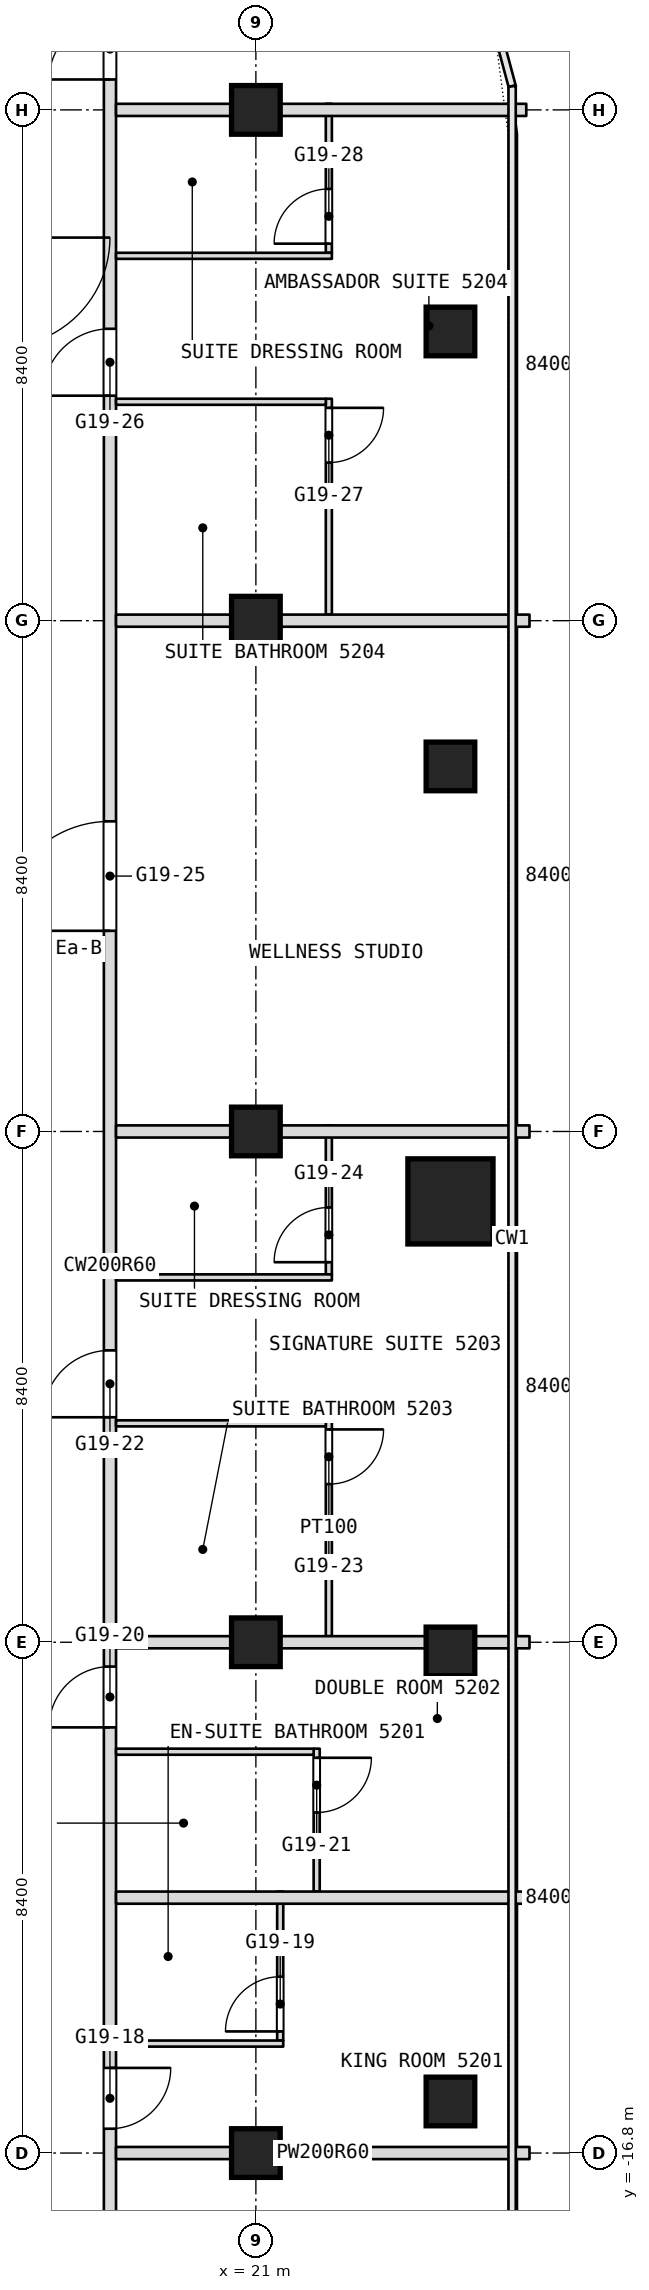
"""IFC4 building model, lengths in metres.
Left out: names, types, materials, properties, quantities, classifications, styles, units other than length and angle.
Written with IfcOpenShell. Run it as: python <this file> out.ifc"""

import sys

from ifc_helpers import new_model, si_unit, direction, frame, frame_2d, origin, origin_2d, place, context, subcontext, project, spatial, rectangle, extrude, element, fill, save


model = new_model("IFC4")
c1 = context("Model", 3, precision=1e-05, world=origin(), true_north=direction((0.0, 1.0)))
c2 = subcontext(c1, "Body", "Model", "MODEL_VIEW")
j1 = project(units=[si_unit("LENGTHUNIT", "METRE"), si_unit("PLANEANGLEUNIT", "RADIAN")], contexts=[c1])
p1 = place(None, origin())
s1 = spatial("IfcSite", under=j1, at=p1, CompositionType="ELEMENT")
p2 = place(p1, origin())
s2 = spatial("IfcBuilding", under=s1, at=p2, CompositionType="ELEMENT")
p3 = place(p2, frame((0.0, 0.0, 223.7)))
s3 = spatial("IfcBuildingStorey", under=s2, at=p3, CompositionType="ELEMENT", Elevation=223.7)
p4 = place(p3, frame((24.2, -1.15, 0.0), z_axis=(0.0, 0.0, 1.0), x_axis=(1.0, 0.0, 0.0)))
e1 = element("IfcColumn", 1, at=p4, inside=s3, PredefinedType="COLUMN", context=c2, shape_type="SweptSolid", body=[
    extrude(rectangle(XDim=1.4, YDim=1.4, at=origin_2d()), origin(), (0.0, 0.0, 1.0), 3.6),
])
for number, where, z_axis, x_axis in (
    (2, (21.0, -16.8, 0.0), (0.0, 0.0, 1.0), (1.0, 0.0, 0.0)),
    (3, (21.0, -8.4, 0.0), (0.0, 0.0, 1.0), (1.0, 0.0, 0.0)),
    (4, (21.0, 0.0, 0.0), (0.0, 0.0, 1.0), (1.0, 0.0, 0.0)),
    (5, (21.0, 8.4, 0.0), (0.0, 0.0, 1.0), (1.0, 0.0, 0.0)),
    (6, (21.0, 16.8, 0.0), (0.0, 0.0, 1.0), (1.0, 0.0, 0.0)),
    (7, (24.2, 13.156, 0.0), (0.0, 0.0, 1.0), (1.0, 0.0, 0.0)),
    (8, (24.2, 6.003, 0.0), (0.0, 0.0, 1.0), (1.0, 0.0, 0.0)),
    (9, (24.2, -8.551, 0.0), (0.0, 0.0, 1.0), (1.0, 0.0, 0.0)),
    (10, (24.2, -15.952, 0.0), (0.0, 0.0, 1.0), (1.0, 0.0, 0.0)),
):
    element("IfcColumn", number, at=place(p3, frame(where, z_axis=z_axis, x_axis=x_axis)), inside=s3, PredefinedType="COLUMN", context=c2, shape_type="SweptSolid", body=[
        extrude(rectangle(XDim=0.8, YDim=0.8, at=origin_2d()), origin(), (0.0, 0.0, 1.0), 3.6),
    ])
p5 = place(p3, frame((22.2, -8.3, 0.0), z_axis=(0.0, 0.0, 1.0), x_axis=(0.0, 1.0, 0.0)))
e11 = element("IfcWall", 11, at=p5, inside=s3, PredefinedType="PARTITIONING", context=c2, shape_type="SweptSolid", body=[
    extrude(rectangle(XDim=3.55, YDim=0.1, at=frame_2d((1.775, 0.0))), origin(), (0.0, 0.0, 1.0), 3.34),
])
p6 = place(p5, frame((2.5, 0.0, 0.0)))
e12 = element("IfcOpeningElement", 12, at=p6, cuts=e11, PredefinedType="OPENING", context=c2, shape_type="SweptSolid", body=[
    extrude(rectangle(XDim=0.9, YDim=2.1, at=frame_2d((0.45, 1.05))), frame((0.0, 0.05, 0.0), z_axis=(0.0, -1.0, 0.0), x_axis=(1.0, 0.0, 0.0)), (0.0, 0.0, 1.0), 0.1),
])
p7 = place(p3, frame((22.2, -2.35, 0.0), z_axis=(0.0, 0.0, 1.0), x_axis=(0.0, 1.0, 0.0)))
e13 = element("IfcWall", 13, at=p7, inside=s3, PredefinedType="PARTITIONING", context=c2, shape_type="SweptSolid", body=[
    extrude(rectangle(XDim=2.45, YDim=0.1, at=frame_2d((1.225, 0.0))), origin(), (0.0, 0.0, 1.0), 3.34),
])
p8 = place(p7, frame((0.2, 0.0, 0.0)))
e14 = element("IfcOpeningElement", 14, at=p8, cuts=e13, PredefinedType="OPENING", context=c2, shape_type="SweptSolid", body=[
    extrude(rectangle(XDim=0.9, YDim=2.1, at=frame_2d((0.45, 1.05))), frame((0.0, 0.05, 0.0), z_axis=(0.0, -1.0, 0.0), x_axis=(1.0, 0.0, 0.0)), (0.0, 0.0, 1.0), 0.1),
])
p9 = place(p3, frame((22.2, 8.5, 0.0), z_axis=(0.0, 0.0, 1.0), x_axis=(0.0, 1.0, 0.0)))
e15 = element("IfcWall", 15, at=p9, inside=s3, PredefinedType="PARTITIONING", context=c2, shape_type="SweptSolid", body=[
    extrude(rectangle(XDim=3.55, YDim=0.1, at=frame_2d((1.775, 0.0))), origin(), (0.0, 0.0, 1.0), 3.34),
])
p10 = place(p9, frame((2.5, 0.0, 0.0)))
e16 = element("IfcOpeningElement", 16, at=p10, cuts=e15, PredefinedType="OPENING", context=c2, shape_type="SweptSolid", body=[
    extrude(rectangle(XDim=0.9, YDim=2.1, at=frame_2d((0.45, 1.05))), frame((0.0, 0.05, 0.0), z_axis=(0.0, -1.0, 0.0), x_axis=(1.0, 0.0, 0.0)), (0.0, 0.0, 1.0), 0.1),
])
p11 = place(p3, frame((22.2, 14.45, 0.0), z_axis=(0.0, 0.0, 1.0), x_axis=(0.0, 1.0, 0.0)))
e17 = element("IfcWall", 17, at=p11, inside=s3, PredefinedType="PARTITIONING", context=c2, shape_type="SweptSolid", body=[
    extrude(rectangle(XDim=2.45, YDim=0.1, at=frame_2d((1.225, 0.0))), origin(), (0.0, 0.0, 1.0), 3.34),
])
p12 = place(p11, frame((0.15, 0.0, 0.0)))
e18 = element("IfcOpeningElement", 18, at=p12, cuts=e17, PredefinedType="OPENING", context=c2, shape_type="SweptSolid", body=[
    extrude(rectangle(XDim=0.9, YDim=2.1, at=frame_2d((0.45, 1.05))), frame((0.0, 0.05, 0.0), z_axis=(0.0, -1.0, 0.0), x_axis=(1.0, 0.0, 0.0)), (0.0, 0.0, 1.0), 0.1),
])
p13 = place(p3, frame((22.0, -12.5, 0.0), z_axis=(0.0, 0.0, 1.0), x_axis=(0.0, 1.0, 0.0)))
e19 = element("IfcWall", 19, at=p13, inside=s3, PredefinedType="PARTITIONING", context=c2, shape_type="SweptSolid", body=[
    extrude(rectangle(XDim=2.35, YDim=0.1, at=frame_2d((1.175, 0.0))), origin(), (0.0, 0.0, 1.0), 3.34),
])
p14 = place(p13, frame((1.3, 0.0, 0.0)))
e20 = element("IfcOpeningElement", 20, at=p14, cuts=e19, PredefinedType="OPENING", context=c2, shape_type="SweptSolid", body=[
    extrude(rectangle(XDim=0.9, YDim=2.1, at=frame_2d((0.45, 1.05))), frame((0.0, 0.05, 0.0), z_axis=(0.0, -1.0, 0.0), x_axis=(1.0, 0.0, 0.0)), (0.0, 0.0, 1.0), 0.1),
])
p15 = place(p3, frame((21.4, -14.95, 0.0), z_axis=(0.0, 0.0, 1.0), x_axis=(0.0, 1.0, 0.0)))
e21 = element("IfcWall", 21, at=p15, inside=s3, PredefinedType="PARTITIONING", context=c2, shape_type="SweptSolid", body=[
    extrude(rectangle(XDim=2.45, YDim=0.1, at=frame_2d((1.225, 0.0))), origin(), (0.0, 0.0, 1.0), 3.34),
])
p16 = place(p15, frame((0.15, 0.0, 0.0)))
e22 = element("IfcOpeningElement", 22, at=p16, cuts=e21, PredefinedType="OPENING", context=c2, shape_type="SweptSolid", body=[
    extrude(rectangle(XDim=0.9, YDim=2.1, at=frame_2d((0.45, 1.05))), frame((0.0, 0.05, 0.0), z_axis=(0.0, -1.0, 0.0), x_axis=(1.0, 0.0, 0.0)), (0.0, 0.0, 1.0), 0.1),
])
p17 = place(p3, frame((18.6, -26.751, 0.0), z_axis=(0.0, 0.0, 1.0), x_axis=(0.0, 1.0, 0.0)))
e23 = element("IfcWall", 23, at=p17, inside=s3, PredefinedType="PARTITIONING", context=c2, shape_type="SweptSolid", body=[
    extrude(rectangle(XDim=49.091, YDim=0.2, at=frame_2d((24.545, 0.0))), origin(), (0.0, 0.0, 1.0), 3.34),
])
p18 = place(p17, frame((4.226, 0.0, 0.0)))
e24 = element("IfcOpeningElement", 24, at=p18, cuts=e23, PredefinedType="OPENING", context=c2, shape_type="SweptSolid", body=[
    extrude(rectangle(XDim=1.8, YDim=2.1, at=frame_2d((0.9, 1.05))), frame((0.0, 0.1, 0.0), z_axis=(0.0, -1.0, 0.0), x_axis=(1.0, 0.0, 0.0)), (0.0, 0.0, 1.0), 0.2),
])
p19 = place(p17, frame((10.351, 0.0, 0.0)))
e25 = element("IfcOpeningElement", 25, at=p19, cuts=e23, PredefinedType="OPENING", context=c2, shape_type="SweptSolid", body=[
    extrude(rectangle(XDim=1.0, YDim=2.1, at=frame_2d((0.5, 1.05))), frame((0.0, 0.1, 0.0), z_axis=(0.0, -1.0, 0.0), x_axis=(1.0, 0.0, 0.0)), (0.0, 0.0, 1.0), 0.2),
])
p20 = place(p17, frame((16.951, 0.0, 0.0)))
e26 = element("IfcOpeningElement", 26, at=p20, cuts=e23, PredefinedType="OPENING", context=c2, shape_type="SweptSolid", body=[
    extrude(rectangle(XDim=1.0, YDim=2.1, at=frame_2d((0.5, 1.05))), frame((0.0, 0.1, 0.0), z_axis=(0.0, -1.0, 0.0), x_axis=(1.0, 0.0, 0.0)), (0.0, 0.0, 1.0), 0.2),
])
p21 = place(p17, frame((22.051, 0.0, 0.0)))
e27 = element("IfcOpeningElement", 27, at=p21, cuts=e23, PredefinedType="OPENING", context=c2, shape_type="SweptSolid", body=[
    extrude(rectangle(XDim=1.1, YDim=2.1, at=frame_2d((0.55, 1.05))), frame((0.0, 0.1, 0.0), z_axis=(0.0, -1.0, 0.0), x_axis=(1.0, 0.0, 0.0)), (0.0, 0.0, 1.0), 0.2),
])
p22 = place(p17, frame((30.051, 0.0, 0.0)))
e28 = element("IfcOpeningElement", 28, at=p22, cuts=e23, PredefinedType="OPENING", context=c2, shape_type="SweptSolid", body=[
    extrude(rectangle(XDim=1.8, YDim=2.1, at=frame_2d((0.9, 1.05))), frame((0.0, 0.1, 0.0), z_axis=(0.0, -1.0, 0.0), x_axis=(1.0, 0.0, 0.0)), (0.0, 0.0, 1.0), 0.2),
])
p23 = place(p17, frame((38.851, 0.0, 0.0)))
e29 = element("IfcOpeningElement", 29, at=p23, cuts=e23, PredefinedType="OPENING", context=c2, shape_type="SweptSolid", body=[
    extrude(rectangle(XDim=1.1, YDim=2.1, at=frame_2d((0.55, 1.05))), frame((0.0, 0.1, 0.0), z_axis=(0.0, -1.0, 0.0), x_axis=(1.0, 0.0, 0.0)), (0.0, 0.0, 1.0), 0.2),
])
p24 = place(p17, frame((44.051, 0.0, 0.0)))
e30 = element("IfcOpeningElement", 30, at=p24, cuts=e23, PredefinedType="OPENING", context=c2, shape_type="SweptSolid", body=[
    extrude(rectangle(XDim=1.0, YDim=2.1, at=frame_2d((0.5, 1.05))), frame((0.0, 0.1, 0.0), z_axis=(0.0, -1.0, 0.0), x_axis=(1.0, 0.0, 0.0)), (0.0, 0.0, 1.0), 0.2),
])
p25 = place(p3, frame((18.7, -16.8, 0.0), z_axis=(0.0, 0.0, 1.0), x_axis=(1.0, 0.0, 0.0)))
e31 = element("IfcWall", 31, at=p25, inside=s3, PredefinedType="PARTITIONING", context=c2, shape_type="SweptSolid", body=[
    extrude(rectangle(XDim=6.8, YDim=0.2, at=frame_2d((3.4, 0.0))), origin(), (0.0, 0.0, 1.0), 2.94),
])
p26 = place(p3, frame((18.7, -15.0, 0.0), z_axis=(0.0, 0.0, 1.0), x_axis=(1.0, 0.0, 0.0)))
e32 = element("IfcWall", 32, at=p26, inside=s3, PredefinedType="PARTITIONING", context=c2, shape_type="SweptSolid", body=[
    extrude(rectangle(XDim=2.75, YDim=0.1, at=frame_2d((1.375, 0.0))), origin(), (0.0, 0.0, 1.0), 3.34),
])
p27 = place(p3, frame((18.7, -12.6, 0.0), z_axis=(0.0, 0.0, 1.0), x_axis=(1.0, 0.0, 0.0)))
e33 = element("IfcWall", 33, at=p27, inside=s3, PredefinedType="PARTITIONING", context=c2, shape_type="SweptSolid", body=[
    extrude(rectangle(XDim=6.8, YDim=0.2, at=frame_2d((3.4, 0.0))), origin(), (0.0, 0.0, 1.0), 3.34),
])
p28 = place(p3, frame((18.7, -10.2, 0.0), z_axis=(0.0, 0.0, 1.0), x_axis=(1.0, 0.0, 0.0)))
e34 = element("IfcWall", 34, at=p28, inside=s3, PredefinedType="PARTITIONING", context=c2, shape_type="SweptSolid", body=[
    extrude(rectangle(XDim=3.25, YDim=0.1, at=frame_2d((1.625, 0.0))), origin(), (0.0, 0.0, 1.0), 3.34),
])
p29 = place(p3, frame((18.7, -8.4, 0.0), z_axis=(0.0, 0.0, 1.0), x_axis=(1.0, 0.0, 0.0)))
e35 = element("IfcWall", 35, at=p29, inside=s3, PredefinedType="PARTITIONING", context=c2, shape_type="SweptSolid", body=[
    extrude(rectangle(XDim=6.8, YDim=0.2, at=frame_2d((3.4, 0.0))), origin(), (0.0, 0.0, 1.0), 2.94),
])
p30 = place(p3, frame((18.7, -4.8, 0.0), z_axis=(0.0, 0.0, 1.0), x_axis=(1.0, 0.0, 0.0)))
e36 = element("IfcWall", 36, at=p30, inside=s3, PredefinedType="PARTITIONING", context=c2, shape_type="SweptSolid", body=[
    extrude(rectangle(XDim=3.45, YDim=0.1, at=frame_2d((1.725, 0.0))), origin(), (0.0, 0.0, 1.0), 3.34),
])
p31 = place(p3, frame((18.7, -2.4, 0.0), z_axis=(0.0, 0.0, 1.0), x_axis=(1.0, 0.0, 0.0)))
e37 = element("IfcWall", 37, at=p31, inside=s3, PredefinedType="PARTITIONING", context=c2, shape_type="SweptSolid", body=[
    extrude(rectangle(XDim=3.55, YDim=0.1, at=frame_2d((1.775, 0.0))), origin(), (0.0, 0.0, 1.0), 3.34),
])
for number, where, z_axis, x_axis in (
    (38, (18.7, 0.0, 0.0), (0.0, 0.0, 1.0), (1.0, 0.0, 0.0)),
    (39, (18.7, 8.4, 0.0), (0.0, 0.0, 1.0), (1.0, 0.0, 0.0)),
):
    element("IfcWall", number, at=place(p3, frame(where, z_axis=z_axis, x_axis=x_axis)), inside=s3, PredefinedType="PARTITIONING", context=c2, shape_type="SweptSolid", body=[
        extrude(rectangle(XDim=6.8, YDim=0.2, at=frame_2d((3.4, 0.0))), origin(), (0.0, 0.0, 1.0), 2.94),
    ])
p32 = place(p3, frame((18.7, 12.0, 0.0), z_axis=(0.0, 0.0, 1.0), x_axis=(1.0, 0.0, 0.0)))
e40 = element("IfcWall", 40, at=p32, inside=s3, PredefinedType="PARTITIONING", context=c2, shape_type="SweptSolid", body=[
    extrude(rectangle(XDim=3.45, YDim=0.1, at=frame_2d((1.725, 0.0))), origin(), (0.0, 0.0, 1.0), 3.34),
])
p33 = place(p3, frame((18.7, 14.4, 0.0), z_axis=(0.0, 0.0, 1.0), x_axis=(1.0, 0.0, 0.0)))
e41 = element("IfcWall", 41, at=p33, inside=s3, PredefinedType="PARTITIONING", context=c2, shape_type="SweptSolid", body=[
    extrude(rectangle(XDim=3.55, YDim=0.1, at=frame_2d((1.775, 0.0))), origin(), (0.0, 0.0, 1.0), 3.34),
])
p34 = place(p3, frame((18.7, 16.8, 0.0), z_axis=(0.0, 0.0, 1.0), x_axis=(1.0, 0.0, 0.0)))
e42 = element("IfcWall", 42, at=p34, inside=s3, PredefinedType="PARTITIONING", context=c2, shape_type="SweptSolid", body=[
    extrude(rectangle(XDim=6.747, YDim=0.2, at=frame_2d((3.374, 0.0))), origin(), (0.0, 0.0, 1.0), 2.94),
])
p35 = place(p6, origin())
e43 = element("IfcDoor", 43, at=p35, inside=s3, OperationType="SINGLE_SWING_RIGHT", PredefinedType="DOOR", context=c2, shape_type="SweptSolid", body=[
    extrude(rectangle(XDim=0.9, YDim=2.1, at=frame_2d((0.45, 1.05))), frame((0.0, 0.025, 0.0), z_axis=(0.0, -1.0, 0.0), x_axis=(1.0, 0.0, 0.0)), (0.0, 0.0, 1.0), 0.05),
])
fill(e12, e43)
p36 = place(p8, origin())
e44 = element("IfcDoor", 44, at=p36, inside=s3, OperationType="SINGLE_SWING_LEFT", PredefinedType="DOOR", context=c2, shape_type="SweptSolid", body=[
    extrude(rectangle(XDim=0.9, YDim=2.1, at=frame_2d((0.45, 1.05))), frame((0.0, 0.025, 0.0), z_axis=(0.0, -1.0, 0.0), x_axis=(1.0, 0.0, 0.0)), (0.0, 0.0, 1.0), 0.05),
])
fill(e14, e44)
p37 = place(p10, origin())
e45 = element("IfcDoor", 45, at=p37, inside=s3, OperationType="SINGLE_SWING_RIGHT", PredefinedType="DOOR", context=c2, shape_type="SweptSolid", body=[
    extrude(rectangle(XDim=0.9, YDim=2.1, at=frame_2d((0.45, 1.05))), frame((0.0, 0.025, 0.0), z_axis=(0.0, -1.0, 0.0), x_axis=(1.0, 0.0, 0.0)), (0.0, 0.0, 1.0), 0.05),
])
fill(e16, e45)
p38 = place(p12, origin())
e46 = element("IfcDoor", 46, at=p38, inside=s3, OperationType="SINGLE_SWING_LEFT", PredefinedType="DOOR", context=c2, shape_type="SweptSolid", body=[
    extrude(rectangle(XDim=0.9, YDim=2.1, at=frame_2d((0.45, 1.05))), frame((0.0, 0.025, 0.0), z_axis=(0.0, -1.0, 0.0), x_axis=(1.0, 0.0, 0.0)), (0.0, 0.0, 1.0), 0.05),
])
fill(e18, e46)
p39 = place(p14, origin())
e47 = element("IfcDoor", 47, at=p39, inside=s3, OperationType="SINGLE_SWING_RIGHT", PredefinedType="DOOR", context=c2, shape_type="SweptSolid", body=[
    extrude(rectangle(XDim=0.9, YDim=2.1, at=frame_2d((0.45, 1.05))), frame((0.0, 0.025, 0.0), z_axis=(0.0, -1.0, 0.0), x_axis=(1.0, 0.0, 0.0)), (0.0, 0.0, 1.0), 0.05),
])
fill(e20, e47)
p40 = place(p16, origin())
e48 = element("IfcDoor", 48, at=p40, inside=s3, OperationType="SINGLE_SWING_LEFT", PredefinedType="DOOR", context=c2, shape_type="SweptSolid", body=[
    extrude(rectangle(XDim=0.9, YDim=2.1, at=frame_2d((0.45, 1.05))), frame((0.0, 0.025, 0.0), z_axis=(0.0, -1.0, 0.0), x_axis=(1.0, 0.0, 0.0)), (0.0, 0.0, 1.0), 0.05),
])
fill(e22, e48)
p41 = place(p19, origin())
e49 = element("IfcDoor", 49, at=p41, inside=s3, OperationType="SINGLE_SWING_RIGHT", PredefinedType="DOOR", context=c2, shape_type="SweptSolid", body=[
    extrude(rectangle(XDim=1.0, YDim=2.1, at=frame_2d((0.5, 1.05))), frame((0.0, 0.025, 0.0), z_axis=(0.0, -1.0, 0.0), x_axis=(1.0, 0.0, 0.0)), (0.0, 0.0, 1.0), 0.05),
])
fill(e25, e49)
p42 = place(p20, origin())
e50 = element("IfcDoor", 50, at=p42, inside=s3, OperationType="SINGLE_SWING_RIGHT", PredefinedType="DOOR", context=c2, shape_type="SweptSolid", body=[
    extrude(rectangle(XDim=1.0, YDim=2.1, at=frame_2d((0.5, 1.05))), frame((0.0, 0.025, 0.0), z_axis=(0.0, -1.0, 0.0), x_axis=(1.0, 0.0, 0.0)), (0.0, 0.0, 1.0), 0.05),
])
fill(e26, e50)
p43 = place(p21, origin())
e51 = element("IfcDoor", 51, at=p43, inside=s3, OperationType="SINGLE_SWING_RIGHT", PredefinedType="DOOR", context=c2, shape_type="SweptSolid", body=[
    extrude(rectangle(XDim=1.1, YDim=2.1, at=frame_2d((0.55, 1.05))), frame((0.0, 0.025, 0.0), z_axis=(0.0, -1.0, 0.0), x_axis=(1.0, 0.0, 0.0)), (0.0, 0.0, 1.0), 0.05),
])
fill(e27, e51)
p44 = place(p22, origin())
e52 = element("IfcDoor", 52, at=p44, inside=s3, OperationType="DOUBLE_DOOR_SINGLE_SWING", PredefinedType="DOOR", context=c2, shape_type="SweptSolid", body=[
    extrude(rectangle(XDim=1.8, YDim=2.1, at=frame_2d((0.9, 1.05))), frame((0.0, 0.025, 0.0), z_axis=(0.0, -1.0, 0.0), x_axis=(1.0, 0.0, 0.0)), (0.0, 0.0, 1.0), 0.05),
])
fill(e28, e52)
p45 = place(p23, origin())
e53 = element("IfcDoor", 53, at=p45, inside=s3, OperationType="SINGLE_SWING_RIGHT", PredefinedType="DOOR", context=c2, shape_type="SweptSolid", body=[
    extrude(rectangle(XDim=1.1, YDim=2.1, at=frame_2d((0.55, 1.05))), frame((0.0, 0.025, 0.0), z_axis=(0.0, -1.0, 0.0), x_axis=(1.0, 0.0, 0.0)), (0.0, 0.0, 1.0), 0.05),
])
fill(e29, e53)
p46 = place(p24, origin())
e54 = element("IfcDoor", 54, at=p46, inside=s3, OperationType="SINGLE_SWING_LEFT", PredefinedType="DOOR", context=c2, shape_type="SweptSolid", body=[
    extrude(rectangle(XDim=1.0, YDim=2.1, at=frame_2d((0.5, 1.05))), frame((0.0, 0.025, 0.0), z_axis=(0.0, -1.0, 0.0), x_axis=(1.0, 0.0, 0.0)), (0.0, 0.0, 1.0), 0.05),
])
fill(e30, e54)
save(model, sys.argv[1])
